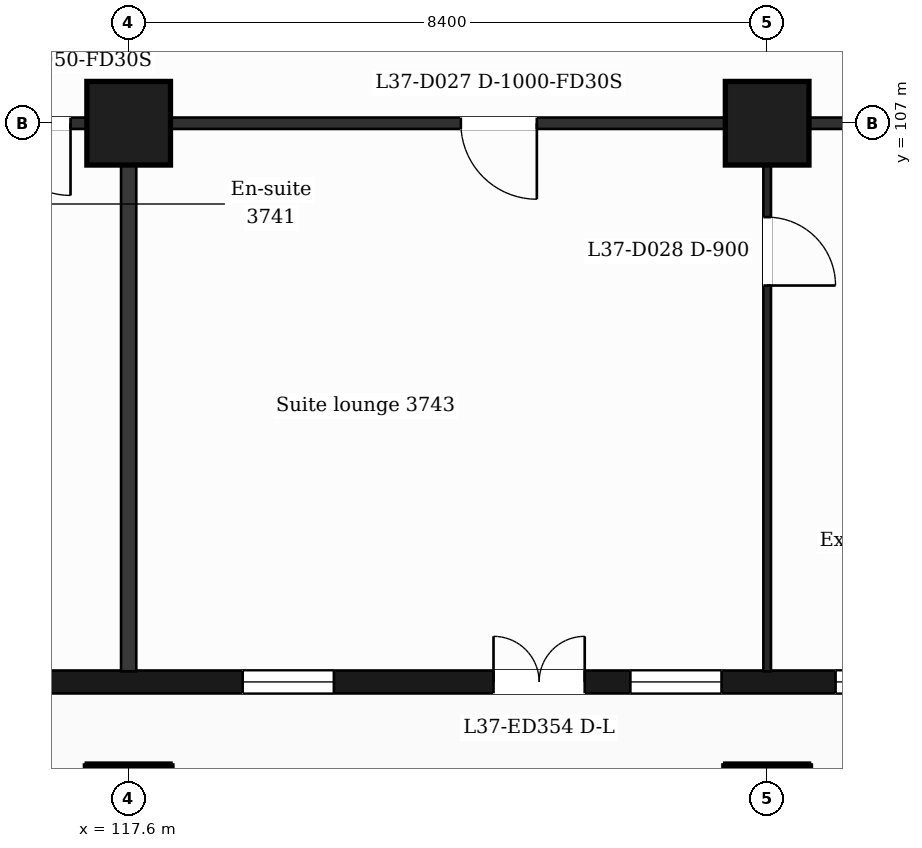
"""IFC4 building model, lengths in metres.
Left out: names, types, materials, properties, quantities, classifications, styles, units other than length and angle.
Written with IfcOpenShell. Run it as: python <this file> out.ifc"""

import sys

from ifc_helpers import new_model, si_unit, direction, frame, frame_2d, origin, origin_2d, place, context, subcontext, project, spatial, rectangle, extrude, element, fill, save


model = new_model("IFC4")
c1 = context("Model", 3, precision=1e-05, world=origin(), true_north=direction((0.0, 1.0)))
c2 = subcontext(c1, "Body", "Model", "MODEL_VIEW")
j1 = project(units=[si_unit("LENGTHUNIT", "METRE"), si_unit("PLANEANGLEUNIT", "RADIAN")], contexts=[c1])
p1 = place(None, origin())
s1 = spatial("IfcSite", under=j1, at=p1, CompositionType="ELEMENT")
p2 = place(p1, origin())
s2 = spatial("IfcBuilding", under=s1, at=p2, CompositionType="ELEMENT")
p3 = place(p2, frame((0.0, 0.0, 158.9)))
s3 = spatial("IfcBuildingStorey", under=s2, at=p3, CompositionType="ELEMENT", Elevation=158.9)
for number, where, z_axis, x_axis in (
    (1, (117.6, 98.0, 0.0), (0.0, 0.0, 1.0), (1.0, 0.0, 0.0)),
    (2, (126.0, 98.0, 0.0), (0.0, 0.0, 1.0), (1.0, 0.0, 0.0)),
    (3, (117.6, 107.0, 0.0), (0.0, 0.0, 1.0), (1.0, 0.0, 0.0)),
    (4, (126.0, 107.0, 0.0), (0.0, 0.0, 1.0), (1.0, 0.0, 0.0)),
):
    element("IfcColumn", number, at=place(p3, frame(where, z_axis=z_axis, x_axis=x_axis)), inside=s3, PredefinedType="COLUMN", context=c2, shape_type="SweptSolid", body=[
        extrude(rectangle(XDim=1.1, YDim=1.1, at=origin_2d()), origin(), (0.0, 0.0, 1.0), 3.7),
    ])
p4 = place(p3, frame((89.85, 99.65, 0.0), z_axis=(0.0, 0.0, 1.0), x_axis=(1.0, 0.0, 0.0)))
e5 = element("IfcWall", 5, at=p4, inside=s3, PredefinedType="SOLIDWALL", context=c2, shape_type="SweptSolid", body=[
    extrude(rectangle(XDim=47.25, YDim=0.3, at=frame_2d((23.625, 0.0))), origin(), (0.0, 0.0, 1.0), 3.38),
])
p5 = place(p4, frame((0.725, 0.0, 0.9)))
e6 = element("IfcOpeningElement", 6, at=p5, cuts=e5, PredefinedType="OPENING", context=c2, shape_type="SweptSolid", body=[
    extrude(rectangle(XDim=1.2, YDim=2.1, at=frame_2d((0.6, 1.05))), frame((0.0, 0.16, 0.0), z_axis=(0.0, -1.0, 0.0), x_axis=(1.0, 0.0, 0.0)), (0.0, 0.0, 1.0), 0.32),
])
p6 = place(p4, frame((3.45, 0.0, 0.9)))
e7 = element("IfcOpeningElement", 7, at=p6, cuts=e5, PredefinedType="OPENING", context=c2, shape_type="SweptSolid", body=[
    extrude(rectangle(XDim=2.4, YDim=2.1, at=frame_2d((1.2, 1.05))), frame((0.0, 0.16, 0.0), z_axis=(0.0, -1.0, 0.0), x_axis=(1.0, 0.0, 0.0)), (0.0, 0.0, 1.0), 0.32),
])
p7 = place(p4, frame((7.65, 0.0, 0.9)))
e8 = element("IfcOpeningElement", 8, at=p7, cuts=e5, PredefinedType="OPENING", context=c2, shape_type="SweptSolid", body=[
    extrude(rectangle(XDim=2.4, YDim=2.1, at=frame_2d((1.2, 1.05))), frame((0.0, 0.16, 0.0), z_axis=(0.0, -1.0, 0.0), x_axis=(1.0, 0.0, 0.0)), (0.0, 0.0, 1.0), 0.32),
])
p8 = place(p4, frame((11.85, 0.0, 0.9)))
e9 = element("IfcOpeningElement", 9, at=p8, cuts=e5, PredefinedType="OPENING", context=c2, shape_type="SweptSolid", body=[
    extrude(rectangle(XDim=2.4, YDim=2.1, at=frame_2d((1.2, 1.05))), frame((0.0, 0.16, 0.0), z_axis=(0.0, -1.0, 0.0), x_axis=(1.0, 0.0, 0.0)), (0.0, 0.0, 1.0), 0.32),
])
p9 = place(p4, frame((16.05, 0.0, 0.9)))
e10 = element("IfcOpeningElement", 10, at=p9, cuts=e5, PredefinedType="OPENING", context=c2, shape_type="SweptSolid", body=[
    extrude(rectangle(XDim=2.4, YDim=2.1, at=frame_2d((1.2, 1.05))), frame((0.0, 0.16, 0.0), z_axis=(0.0, -1.0, 0.0), x_axis=(1.0, 0.0, 0.0)), (0.0, 0.0, 1.0), 0.32),
])
p10 = place(p4, frame((20.25, 0.0, 0.9)))
e11 = element("IfcOpeningElement", 11, at=p10, cuts=e5, PredefinedType="OPENING", context=c2, shape_type="SweptSolid", body=[
    extrude(rectangle(XDim=2.4, YDim=2.1, at=frame_2d((1.2, 1.05))), frame((0.0, 0.16, 0.0), z_axis=(0.0, -1.0, 0.0), x_axis=(1.0, 0.0, 0.0)), (0.0, 0.0, 1.0), 0.32),
])
p11 = place(p4, frame((25.05, 0.0, 0.9)))
e12 = element("IfcOpeningElement", 12, at=p11, cuts=e5, PredefinedType="OPENING", context=c2, shape_type="SweptSolid", body=[
    extrude(rectangle(XDim=1.2, YDim=2.1, at=frame_2d((0.6, 1.05))), frame((0.0, 0.16, 0.0), z_axis=(0.0, -1.0, 0.0), x_axis=(1.0, 0.0, 0.0)), (0.0, 0.0, 1.0), 0.32),
])
p12 = place(p4, frame((29.25, 0.0, 0.9)))
e13 = element("IfcOpeningElement", 13, at=p12, cuts=e5, PredefinedType="OPENING", context=c2, shape_type="SweptSolid", body=[
    extrude(rectangle(XDim=1.2, YDim=2.1, at=frame_2d((0.6, 1.05))), frame((0.0, 0.16, 0.0), z_axis=(0.0, -1.0, 0.0), x_axis=(1.0, 0.0, 0.0)), (0.0, 0.0, 1.0), 0.32),
])
p13 = place(p4, frame((32.55, 0.0, 0.0)))
e14 = element("IfcOpeningElement", 14, at=p13, cuts=e5, PredefinedType="OPENING", context=c2, shape_type="SweptSolid", body=[
    extrude(rectangle(XDim=1.2, YDim=2.4, at=frame_2d((0.6, 1.2))), frame((0.0, 0.16, 0.0), z_axis=(0.0, -1.0, 0.0), x_axis=(1.0, 0.0, 0.0)), (0.0, 0.0, 1.0), 0.32),
])
p14 = place(p4, frame((34.35, 0.0, 0.9)))
e15 = element("IfcOpeningElement", 15, at=p14, cuts=e5, PredefinedType="OPENING", context=c2, shape_type="SweptSolid", body=[
    extrude(rectangle(XDim=1.2, YDim=2.1, at=frame_2d((0.6, 1.05))), frame((0.0, 0.16, 0.0), z_axis=(0.0, -1.0, 0.0), x_axis=(1.0, 0.0, 0.0)), (0.0, 0.0, 1.0), 0.32),
])
p15 = place(p4, frame((37.05, 0.0, 0.9)))
e16 = element("IfcOpeningElement", 16, at=p15, cuts=e5, PredefinedType="OPENING", context=c2, shape_type="SweptSolid", body=[
    extrude(rectangle(XDim=2.4, YDim=2.1, at=frame_2d((1.2, 1.05))), frame((0.0, 0.16, 0.0), z_axis=(0.0, -1.0, 0.0), x_axis=(1.0, 0.0, 0.0)), (0.0, 0.0, 1.0), 0.32),
])
p16 = place(p4, frame((40.95, 0.0, 0.0)))
e17 = element("IfcOpeningElement", 17, at=p16, cuts=e5, PredefinedType="OPENING", context=c2, shape_type="SweptSolid", body=[
    extrude(rectangle(XDim=1.2, YDim=2.4, at=frame_2d((0.6, 1.2))), frame((0.0, 0.16, 0.0), z_axis=(0.0, -1.0, 0.0), x_axis=(1.0, 0.0, 0.0)), (0.0, 0.0, 1.0), 0.32),
])
p17 = place(p4, frame((42.75, 0.0, 0.9)))
e18 = element("IfcOpeningElement", 18, at=p17, cuts=e5, PredefinedType="OPENING", context=c2, shape_type="SweptSolid", body=[
    extrude(rectangle(XDim=1.2, YDim=2.1, at=frame_2d((0.6, 1.05))), frame((0.0, 0.16, 0.0), z_axis=(0.0, -1.0, 0.0), x_axis=(1.0, 0.0, 0.0)), (0.0, 0.0, 1.0), 0.32),
])
p18 = place(p4, frame((45.25, 0.0, 0.9)))
e19 = element("IfcOpeningElement", 19, at=p18, cuts=e5, PredefinedType="OPENING", context=c2, shape_type="SweptSolid", body=[
    extrude(rectangle(XDim=1.2, YDim=2.1, at=frame_2d((0.6, 1.05))), frame((0.0, 0.16, 0.0), z_axis=(0.0, -1.0, 0.0), x_axis=(1.0, 0.0, 0.0)), (0.0, 0.0, 1.0), 0.32),
])
p19 = place(p3, frame((87.018, 107.0, 0.0), z_axis=(0.0, 0.0, 1.0), x_axis=(1.0, 0.0, 0.0)))
e20 = element("IfcWall", 20, at=p19, inside=s3, PredefinedType="PARTITIONING", context=c2, shape_type="SweptSolid", body=[
    extrude(rectangle(XDim=52.765, YDim=0.15, at=frame_2d((26.382, 0.0))), origin(), (0.0, 0.0, 1.0), 3.38),
])
p20 = place(p19, frame((1.032, 0.0, 0.0)))
e21 = element("IfcOpeningElement", 21, at=p20, cuts=e20, PredefinedType="OPENING", context=c2, shape_type="SweptSolid", body=[
    extrude(rectangle(XDim=0.95, YDim=2.1, at=frame_2d((0.475, 1.05))), frame((0.0, 0.085, 0.0), z_axis=(0.0, -1.0, 0.0), x_axis=(1.0, 0.0, 0.0)), (0.0, 0.0, 1.0), 0.17),
])
p21 = place(p19, frame((6.369, 0.0, 0.0)))
e22 = element("IfcOpeningElement", 22, at=p21, cuts=e20, PredefinedType="OPENING", context=c2, shape_type="SweptSolid", body=[
    extrude(rectangle(XDim=0.95, YDim=2.1, at=frame_2d((0.475, 1.05))), frame((0.0, 0.085, 0.0), z_axis=(0.0, -1.0, 0.0), x_axis=(1.0, 0.0, 0.0)), (0.0, 0.0, 1.0), 0.17),
])
p22 = place(p19, frame((16.812, 0.0, 0.0)))
e23 = element("IfcOpeningElement", 23, at=p22, cuts=e20, PredefinedType="OPENING", context=c2, shape_type="SweptSolid", body=[
    extrude(rectangle(XDim=1.0, YDim=2.1, at=frame_2d((0.5, 1.05))), frame((0.0, 0.085, 0.0), z_axis=(0.0, -1.0, 0.0), x_axis=(1.0, 0.0, 0.0)), (0.0, 0.0, 1.0), 0.17),
])
p23 = place(p19, frame((25.157, 0.0, 0.0)))
e24 = element("IfcOpeningElement", 24, at=p23, cuts=e20, PredefinedType="OPENING", context=c2, shape_type="SweptSolid", body=[
    extrude(rectangle(XDim=0.95, YDim=2.1, at=frame_2d((0.475, 1.05))), frame((0.0, 0.085, 0.0), z_axis=(0.0, -1.0, 0.0), x_axis=(1.0, 0.0, 0.0)), (0.0, 0.0, 1.0), 0.17),
])
p24 = place(p19, frame((28.867, 0.0, 0.0)))
e25 = element("IfcOpeningElement", 25, at=p24, cuts=e20, PredefinedType="OPENING", context=c2, shape_type="SweptSolid", body=[
    extrude(rectangle(XDim=0.95, YDim=2.1, at=frame_2d((0.475, 1.05))), frame((0.0, 0.085, 0.0), z_axis=(0.0, -1.0, 0.0), x_axis=(1.0, 0.0, 0.0)), (0.0, 0.0, 1.0), 0.17),
])
p25 = place(p19, frame((34.952, 0.0, 0.0)))
e26 = element("IfcOpeningElement", 26, at=p25, cuts=e20, PredefinedType="OPENING", context=c2, shape_type="SweptSolid", body=[
    extrude(rectangle(XDim=1.0, YDim=2.1, at=frame_2d((0.5, 1.05))), frame((0.0, 0.085, 0.0), z_axis=(0.0, -1.0, 0.0), x_axis=(1.0, 0.0, 0.0)), (0.0, 0.0, 1.0), 0.17),
])
p26 = place(p19, frame((45.632, 0.0, 0.0)))
e27 = element("IfcOpeningElement", 27, at=p26, cuts=e20, PredefinedType="OPENING", context=c2, shape_type="SweptSolid", body=[
    extrude(rectangle(XDim=0.95, YDim=2.1, at=frame_2d((0.475, 1.05))), frame((0.0, 0.085, 0.0), z_axis=(0.0, -1.0, 0.0), x_axis=(1.0, 0.0, 0.0)), (0.0, 0.0, 1.0), 0.17),
])
p27 = place(p19, frame((48.56, 0.0, 0.0)))
e28 = element("IfcOpeningElement", 28, at=p27, cuts=e20, PredefinedType="OPENING", context=c2, shape_type="SweptSolid", body=[
    extrude(rectangle(XDim=0.95, YDim=2.1, at=frame_2d((0.475, 1.05))), frame((0.0, 0.085, 0.0), z_axis=(0.0, -1.0, 0.0), x_axis=(1.0, 0.0, 0.0)), (0.0, 0.0, 1.0), 0.17),
])
p28 = place(p3, frame((117.6, 99.79, 0.0), z_axis=(0.0, 0.0, 1.0), x_axis=(0.0, 1.0, 0.0)))
e29 = element("IfcWall", 29, at=p28, inside=s3, PredefinedType="PARTITIONING", context=c2, shape_type="SweptSolid", body=[
    extrude(rectangle(XDim=7.135, YDim=0.2, at=frame_2d((3.567, 0.0))), origin(), (0.0, 0.0, 1.0), 3.38),
])
p29 = place(p3, frame((126.0, 99.79, 0.0), z_axis=(0.0, 0.0, 1.0), x_axis=(0.0, 1.0, 0.0)))
e30 = element("IfcWall", 30, at=p29, inside=s3, PredefinedType="PARTITIONING", context=c2, shape_type="SweptSolid", body=[
    extrude(rectangle(XDim=7.135, YDim=0.1, at=frame_2d((3.567, 0.0))), origin(), (0.0, 0.0, 1.0), 3.38),
])
p30 = place(p29, frame((5.075, 0.0, 0.0)))
e31 = element("IfcOpeningElement", 31, at=p30, cuts=e30, PredefinedType="OPENING", context=c2, shape_type="SweptSolid", body=[
    extrude(rectangle(XDim=0.9, YDim=2.1, at=frame_2d((0.45, 1.05))), frame((0.0, 0.06, 0.0), z_axis=(0.0, -1.0, 0.0), x_axis=(1.0, 0.0, 0.0)), (0.0, 0.0, 1.0), 0.12),
])
p31 = place(p12, origin())
e32 = element("IfcWindow", 32, at=p31, inside=s3, PartitioningType="SINGLE_PANEL", PredefinedType="WINDOW", context=c2, shape_type="SweptSolid", body=[
    extrude(rectangle(XDim=1.2, YDim=2.1, at=frame_2d((0.6, 1.05))), frame((0.0, 0.03, 0.0), z_axis=(0.0, -1.0, 0.0), x_axis=(1.0, 0.0, 0.0)), (0.0, 0.0, 1.0), 0.06),
])
fill(e13, e32)
p32 = place(p13, origin())
e33 = element("IfcDoor", 33, at=p32, inside=s3, OperationType="DOUBLE_DOOR_SINGLE_SWING", PredefinedType="DOOR", context=c2, shape_type="SweptSolid", body=[
    extrude(rectangle(XDim=1.2, YDim=2.4, at=frame_2d((0.6, 1.2))), frame((0.0, 0.025, 0.0), z_axis=(0.0, -1.0, 0.0), x_axis=(1.0, 0.0, 0.0)), (0.0, 0.0, 1.0), 0.05),
])
fill(e14, e33)
p33 = place(p14, origin())
e34 = element("IfcWindow", 34, at=p33, inside=s3, PartitioningType="SINGLE_PANEL", PredefinedType="WINDOW", context=c2, shape_type="SweptSolid", body=[
    extrude(rectangle(XDim=1.2, YDim=2.1, at=frame_2d((0.6, 1.05))), frame((0.0, 0.03, 0.0), z_axis=(0.0, -1.0, 0.0), x_axis=(1.0, 0.0, 0.0)), (0.0, 0.0, 1.0), 0.06),
])
fill(e15, e34)
p34 = place(p15, origin())
e35 = element("IfcWindow", 35, at=p34, inside=s3, PartitioningType="SINGLE_PANEL", PredefinedType="WINDOW", context=c2, shape_type="SweptSolid", body=[
    extrude(rectangle(XDim=2.4, YDim=2.1, at=frame_2d((1.2, 1.05))), frame((0.0, 0.03, 0.0), z_axis=(0.0, -1.0, 0.0), x_axis=(1.0, 0.0, 0.0)), (0.0, 0.0, 1.0), 0.06),
])
fill(e16, e35)
p35 = place(p24, origin())
e36 = element("IfcDoor", 36, at=p35, inside=s3, OperationType="SINGLE_SWING_RIGHT", PredefinedType="DOOR", context=c2, shape_type="SweptSolid", body=[
    extrude(rectangle(XDim=0.95, YDim=2.1, at=frame_2d((0.475, 1.05))), frame((0.0, 0.025, 0.0), z_axis=(0.0, -1.0, 0.0), x_axis=(1.0, 0.0, 0.0)), (0.0, 0.0, 1.0), 0.05),
])
fill(e25, e36)
p36 = place(p25, origin())
e37 = element("IfcDoor", 37, at=p36, inside=s3, OperationType="SINGLE_SWING_RIGHT", PredefinedType="DOOR", context=c2, shape_type="SweptSolid", body=[
    extrude(rectangle(XDim=1.0, YDim=2.1, at=frame_2d((0.5, 1.05))), frame((0.0, 0.025, 0.0), z_axis=(0.0, -1.0, 0.0), x_axis=(1.0, 0.0, 0.0)), (0.0, 0.0, 1.0), 0.05),
])
fill(e26, e37)
p37 = place(p30, origin())
e38 = element("IfcDoor", 38, at=p37, inside=s3, OperationType="SINGLE_SWING_LEFT", PredefinedType="DOOR", context=c2, shape_type="SweptSolid", body=[
    extrude(rectangle(XDim=0.9, YDim=2.1, at=frame_2d((0.45, 1.05))), frame((0.0, 0.025, 0.0), z_axis=(0.0, -1.0, 0.0), x_axis=(1.0, 0.0, 0.0)), (0.0, 0.0, 1.0), 0.05),
])
fill(e31, e38)
save(model, sys.argv[1])
